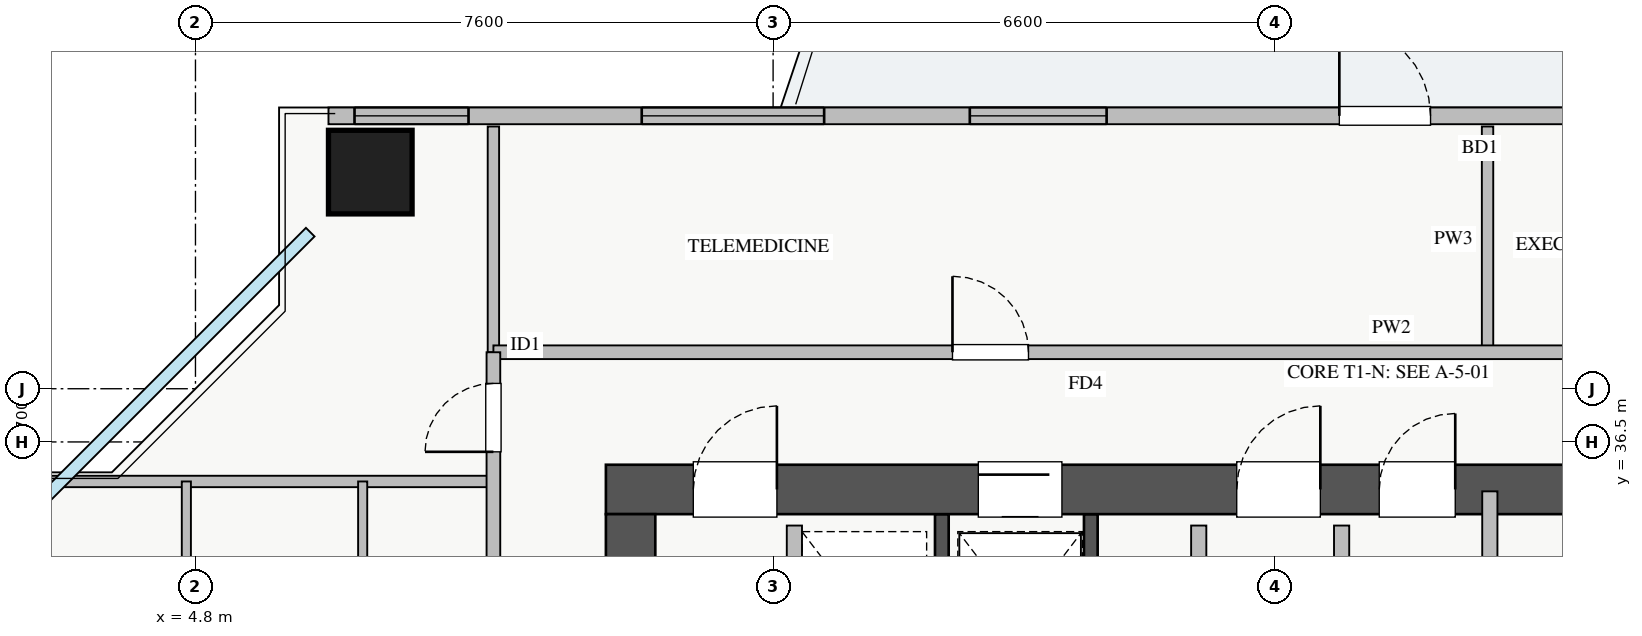
"""IFC4 building model, lengths in metres.
Left out: names, types, materials, properties, quantities, classifications, styles, units other than length and angle.
Written with IfcOpenShell. Run it as: python <this file> out.ifc"""

import sys

from ifc_helpers import new_model, si_unit, direction, frame, frame_2d, origin, origin_2d, place, context, subcontext, project, spatial, rectangle, extrude, source, transform, mapped, element, fill, save


model = new_model("IFC4")
c1 = context("Model", 3, precision=1e-05, world=origin(), true_north=direction((0.0, 1.0)))
c2 = subcontext(c1, "Body", "Model", "MODEL_VIEW")
j1 = project(units=[si_unit("LENGTHUNIT", "METRE"), si_unit("PLANEANGLEUNIT", "RADIAN")], contexts=[c1])
p1 = place(None, origin())
s1 = spatial("IfcSite", under=j1, at=p1, CompositionType="ELEMENT")
p2 = place(p1, origin())
s2 = spatial("IfcBuilding", under=s1, at=p2, CompositionType="ELEMENT")
p3 = place(p2, frame((0.0, 0.0, 126.25)))
s3 = spatial("IfcBuildingStorey", under=s2, at=p3, CompositionType="ELEMENT", Elevation=126.25)
for number, where, z_axis, x_axis in (
    (1, (14.62, 33.2, 0.0), (0.0, 0.0, 1.0), (0.0, 1.0, 0.0)),
    (2, (16.58, 33.2, 0.0), (0.0, 0.0, 1.0), (0.0, 1.0, 0.0)),
):
    element("IfcWall", number, at=place(p3, frame(where, z_axis=z_axis, x_axis=x_axis)), inside=s3, PredefinedType="SHEAR", context=c2, shape_type="SweptSolid", body=[
        extrude(rectangle(XDim=2.35, YDim=0.18, at=frame_2d((1.175, 0.0))), origin(), (0.0, 0.0, 1.0), 3.07),
    ])
p4 = place(p3, frame((10.2, 35.875, 0.0), z_axis=(0.0, 0.0, 1.0), x_axis=(1.0, 0.0, 0.0)))
e3 = element("IfcWall", 3, at=p4, inside=s3, PredefinedType="SHEAR", context=c2, shape_type="SweptSolid", body=[
    extrude(rectangle(XDim=17.6, YDim=0.65, at=frame_2d((8.8, 0.0))), origin(), (0.0, 0.0, 1.0), 3.25),
])
p5 = place(p4, frame((1.15, 0.0, 0.0)))
e4 = element("IfcOpeningElement", 4, at=p5, cuts=e3, PredefinedType="OPENING", context=c2, shape_type="SweptSolid", body=[
    extrude(rectangle(XDim=1.1, YDim=2.05, at=frame_2d((0.55, 1.025))), frame((0.0, 0.335, 0.0), z_axis=(0.0, -1.0, 0.0), x_axis=(1.0, 0.0, 0.0)), (0.0, 0.0, 1.0), 0.67),
])
p6 = place(p4, frame((8.3, 0.0, 0.0)))
e5 = element("IfcOpeningElement", 5, at=p6, cuts=e3, PredefinedType="OPENING", context=c2, shape_type="SweptSolid", body=[
    extrude(rectangle(XDim=1.1, YDim=2.05, at=frame_2d((0.55, 1.025))), frame((0.0, 0.335, 0.0), z_axis=(0.0, -1.0, 0.0), x_axis=(1.0, 0.0, 0.0)), (0.0, 0.0, 1.0), 0.67),
])
p7 = place(p4, frame((4.9, 0.0, 0.0)))
e6 = element("IfcOpeningElement", 6, at=p7, cuts=e3, PredefinedType="OPENING", context=c2, shape_type="SweptSolid", body=[
    extrude(rectangle(XDim=1.1, YDim=2.05, at=frame_2d((0.55, 1.025))), frame((0.0, 0.335, 0.0), z_axis=(0.0, -1.0, 0.0), x_axis=(1.0, 0.0, 0.0)), (0.0, 0.0, 1.0), 0.67),
])
p8 = place(p4, frame((14.74, 0.0, 0.0)))
e7 = element("IfcOpeningElement", 7, at=p8, cuts=e3, PredefinedType="OPENING", context=c2, shape_type="SweptSolid", body=[
    extrude(rectangle(XDim=1.0, YDim=2.05, at=frame_2d((0.5, 1.025))), frame((0.0, 0.335, 0.0), z_axis=(0.0, -1.0, 0.0), x_axis=(1.0, 0.0, 0.0)), (0.0, 0.0, 1.0), 0.67),
])
p9 = place(p4, frame((10.175, 0.0, 0.0)))
e8 = element("IfcOpeningElement", 8, at=p9, cuts=e3, PredefinedType="OPENING", context=c2, shape_type="SweptSolid", body=[
    extrude(rectangle(XDim=1.0, YDim=2.05, at=frame_2d((0.5, 1.025))), frame((0.0, 0.335, 0.0), z_axis=(0.0, -1.0, 0.0), x_axis=(1.0, 0.0, 0.0)), (0.0, 0.0, 1.0), 0.67),
])
p10 = place(p4, frame((12.625, 0.0, 0.0)))
e9 = element("IfcOpeningElement", 9, at=p10, cuts=e3, PredefinedType="OPENING", context=c2, shape_type="SweptSolid", body=[
    extrude(rectangle(XDim=1.0, YDim=2.05, at=frame_2d((0.5, 1.025))), frame((0.0, 0.335, 0.0), z_axis=(0.0, -1.0, 0.0), x_axis=(1.0, 0.0, 0.0)), (0.0, 0.0, 1.0), 0.67),
])
p11 = place(p3, frame((10.525, 29.65, 0.0), z_axis=(0.0, 0.0, 1.0), x_axis=(0.0, 1.0, 0.0)))
e10 = element("IfcWall", 10, at=p11, inside=s3, PredefinedType="SHEAR", context=c2, shape_type="SweptSolid", body=[
    extrude(rectangle(XDim=5.9, YDim=0.65, at=frame_2d((2.95, 0.0))), origin(), (0.0, 0.0, 1.0), 3.25),
])
m1 = source(origin(), c2, "Body", "SweptSolid", [
    extrude(rectangle(XDim=1.1, YDim=1.1, at=origin_2d()), origin(), (0.0, 0.0, 1.0), 3.25),
])
p12 = place(p3, frame((7.1, 40.05, 0.0), z_axis=(0.0, 0.0, 1.0), x_axis=(1.0, 0.0, 0.0)))
e11 = element("IfcColumn", 11, at=p12, inside=s3, PredefinedType="COLUMN", context=c2, shape_type="MappedRepresentation", body=[
    mapped(m1, transform((0.0, 0.0, 0.0), x_axis=(1.0, 0.0, 0.0), y_axis=(0.0, 1.0, 0.0), z_axis=(0.0, 0.0, 1.0), scale=1.0)),
])
p13 = place(p3, frame((6.55, 40.79, 0.0), z_axis=(0.0, 0.0, 1.0), x_axis=(1.0, 0.0, 0.0)))
e12 = element("IfcWall", 12, at=p13, inside=s3, PredefinedType="STANDARD", context=c2, shape_type="SweptSolid", body=[
    extrude(rectangle(XDim=24.9, YDim=0.22, at=frame_2d((12.45, 0.0))), origin(), (0.0, 0.0, 1.0), 2.61),
])
p14 = place(p13, frame((13.3, 0.0, 0.0)))
e13 = element("IfcOpeningElement", 13, at=p14, cuts=e12, PredefinedType="OPENING", context=c2, shape_type="SweptSolid", body=[
    extrude(rectangle(XDim=1.2, YDim=2.1, at=frame_2d((0.6, 1.05))), frame((0.0, 0.12, 0.0), z_axis=(0.0, -1.0, 0.0), x_axis=(1.0, 0.0, 0.0)), (0.0, 0.0, 1.0), 0.24),
])
p15 = place(p13, frame((0.343, 0.0, 0.9)))
e14 = element("IfcOpeningElement", 14, at=p15, cuts=e12, PredefinedType="OPENING", context=c2, shape_type="SweptSolid", body=[
    extrude(rectangle(XDim=1.5, YDim=1.5, at=frame_2d((0.75, 0.75))), frame((0.0, 0.12, 0.0), z_axis=(0.0, -1.0, 0.0), x_axis=(1.0, 0.0, 0.0)), (0.0, 0.0, 1.0), 0.24),
])
p16 = place(p13, frame((8.438, 0.0, 0.9)))
e15 = element("IfcOpeningElement", 15, at=p16, cuts=e12, PredefinedType="OPENING", context=c2, shape_type="SweptSolid", body=[
    extrude(rectangle(XDim=1.8, YDim=1.45, at=frame_2d((0.9, 0.725))), frame((0.0, 0.12, 0.0), z_axis=(0.0, -1.0, 0.0), x_axis=(1.0, 0.0, 0.0)), (0.0, 0.0, 1.0), 0.24),
])
p17 = place(p13, frame((17.261, 0.0, 0.9)))
e16 = element("IfcOpeningElement", 16, at=p17, cuts=e12, PredefinedType="OPENING", context=c2, shape_type="SweptSolid", body=[
    extrude(rectangle(XDim=1.5, YDim=1.5, at=frame_2d((0.75, 0.75))), frame((0.0, 0.12, 0.0), z_axis=(0.0, -1.0, 0.0), x_axis=(1.0, 0.0, 0.0)), (0.0, 0.0, 1.0), 0.24),
])
p18 = place(p13, frame((20.738, 0.0, 0.9)))
e17 = element("IfcOpeningElement", 17, at=p18, cuts=e12, PredefinedType="OPENING", context=c2, shape_type="SweptSolid", body=[
    extrude(rectangle(XDim=2.1, YDim=1.48, at=frame_2d((1.05, 0.74))), frame((0.0, 0.12, 0.0), z_axis=(0.0, -1.0, 0.0), x_axis=(1.0, 0.0, 0.0)), (0.0, 0.0, 1.0), 0.24),
])
p19 = place(p13, frame((4.122, 0.0, 0.9)))
e18 = element("IfcOpeningElement", 18, at=p19, cuts=e12, PredefinedType="OPENING", context=c2, shape_type="SweptSolid", body=[
    extrude(rectangle(XDim=2.4, YDim=1.5, at=frame_2d((1.2, 0.75))), frame((0.0, 0.12, 0.0), z_axis=(0.0, -1.0, 0.0), x_axis=(1.0, 0.0, 0.0)), (0.0, 0.0, 1.0), 0.24),
])
for number, where, z_axis, x_axis in (
    (19, (12.68, 33.19, 0.0), (0.0, 0.0, 1.0), (0.0, 1.0, 0.0)),
    (20, (18.0, 33.19, 0.0), (0.0, 0.0, 1.0), (0.0, 1.0, 0.0)),
    (21, (19.88, 33.19, 0.0), (0.0, 0.0, 1.0), (0.0, 1.0, 0.0)),
):
    element("IfcWall", number, at=place(p3, frame(where, z_axis=z_axis, x_axis=x_axis)), inside=s3, PredefinedType="PARTITIONING", context=c2, shape_type="SweptSolid", body=[
        extrude(rectangle(XDim=2.21, YDim=0.2, at=frame_2d((1.105, 0.0))), origin(), (0.0, 0.0, 1.0), 3.07),
    ])
p20 = place(p3, frame((21.83, 33.2, 0.0), z_axis=(0.0, 0.0, 1.0), x_axis=(0.0, 1.0, 0.0)))
e22 = element("IfcWall", 22, at=p20, inside=s3, PredefinedType="PARTITIONING", context=c2, shape_type="SweptSolid", body=[
    extrude(rectangle(XDim=2.65, YDim=0.2, at=frame_2d((1.325, 0.0))), origin(), (0.0, 0.0, 1.0), 3.07),
])
for number, where, z_axis, x_axis in (
    (23, (21.8, 37.68, 0.0), (0.0, 0.0, 1.0), (0.0, 1.0, 0.0)),
    (24, (8.72, 37.68, 0.0), (0.0, 0.0, 1.0), (0.0, 1.0, 0.0)),
):
    element("IfcWall", number, at=place(p3, frame(where, z_axis=z_axis, x_axis=x_axis)), inside=s3, PredefinedType="PARTITIONING", context=c2, shape_type="SweptSolid", body=[
        extrude(rectangle(XDim=2.97, YDim=0.15, at=frame_2d((1.485, 0.0))), origin(), (0.0, 0.0, 1.0), 3.07),
    ])
p21 = place(p3, frame((8.72, 37.68, 0.0), z_axis=(0.0, 0.0, 1.0), x_axis=(1.0, 0.0, 0.0)))
e25 = element("IfcWall", 25, at=p21, inside=s3, PredefinedType="PARTITIONING", context=c2, shape_type="SweptSolid", body=[
    extrude(rectangle(XDim=23.63, YDim=0.18, at=frame_2d((11.815, 0.0))), origin(), (0.0, 0.0, 1.0), 3.07),
])
p22 = place(p21, frame((6.04, 0.0, 0.0)))
e26 = element("IfcOpeningElement", 26, at=p22, cuts=e25, PredefinedType="OPENING", context=c2, shape_type="SweptSolid", body=[
    extrude(rectangle(XDim=1.0, YDim=2.05, at=frame_2d((0.5, 1.025))), frame((0.0, 0.1, 0.0), z_axis=(0.0, -1.0, 0.0), x_axis=(1.0, 0.0, 0.0)), (0.0, 0.0, 1.0), 0.2),
])
p23 = place(p21, frame((17.67, 0.0, 0.0)))
e27 = element("IfcOpeningElement", 27, at=p23, cuts=e25, PredefinedType="OPENING", context=c2, shape_type="SweptSolid", body=[
    extrude(rectangle(XDim=1.0, YDim=2.05, at=frame_2d((0.5, 1.025))), frame((0.0, 0.1, 0.0), z_axis=(0.0, -1.0, 0.0), x_axis=(1.0, 0.0, 0.0)), (0.0, 0.0, 1.0), 0.2),
])
p24 = place(p3, frame((1.35, 35.98, 0.0), z_axis=(0.0, 0.0, 1.0), x_axis=(1.0, 0.0, 0.0)))
e28 = element("IfcWall", 28, at=p24, inside=s3, PredefinedType="PARTITIONING", context=c2, shape_type="SweptSolid", body=[
    extrude(rectangle(XDim=7.37, YDim=0.15, at=frame_2d((3.685, 0.0))), origin(), (0.0, 0.0, 1.0), 3.07),
])
p25 = place(p3, frame((4.68, 31.42, 0.0), z_axis=(0.0, 0.0, 1.0), x_axis=(0.0, 1.0, 0.0)))
e29 = element("IfcWall", 29, at=p25, inside=s3, PredefinedType="PLUMBINGWALL", context=c2, shape_type="SweptSolid", body=[
    extrude(rectangle(XDim=4.56, YDim=0.12, at=frame_2d((2.28, 0.0))), origin(), (0.0, 0.0, 1.0), 3.07),
])
p26 = place(p3, frame((7.0, 31.42, 0.0), z_axis=(0.0, 0.0, 1.0), x_axis=(0.0, 1.0, 0.0)))
e30 = element("IfcWall", 30, at=p26, inside=s3, PredefinedType="PLUMBINGWALL", context=c2, shape_type="SweptSolid", body=[
    extrude(rectangle(XDim=4.56, YDim=0.12, at=frame_2d((2.28, 0.0))), origin(), (0.0, 0.0, 1.0), 2.577),
])
p27 = place(p3, frame((8.72, 8.31, 0.0), z_axis=(0.0, 0.0, 1.0), x_axis=(0.0, 1.0, 0.0)))
e31 = element("IfcWall", 31, at=p27, inside=s3, PredefinedType="PARTITIONING", context=c2, shape_type="SweptSolid", body=[
    extrude(rectangle(XDim=29.37, YDim=0.18, at=frame_2d((14.685, 0.0))), origin(), (0.0, 0.0, 1.0), 3.07),
])
p28 = place(p27, frame((28.06, 0.0, 0.0)))
e32 = element("IfcOpeningElement", 32, at=p28, cuts=e31, PredefinedType="OPENING", context=c2, shape_type="SweptSolid", body=[
    extrude(rectangle(XDim=0.9, YDim=2.05, at=frame_2d((0.45, 1.025))), frame((0.0, 0.1, 0.0), z_axis=(0.0, -1.0, 0.0), x_axis=(1.0, 0.0, 0.0)), (0.0, 0.0, 1.0), 0.2),
])
p29 = place(p27, frame((0.24, 0.0, 0.0)))
e33 = element("IfcOpeningElement", 33, at=p29, cuts=e31, PredefinedType="OPENING", context=c2, shape_type="SweptSolid", body=[
    extrude(rectangle(XDim=0.9, YDim=2.05, at=frame_2d((0.45, 1.025))), frame((0.0, 0.1, 0.0), z_axis=(0.0, -1.0, 0.0), x_axis=(1.0, 0.0, 0.0)), (0.0, 0.0, 1.0), 0.2),
])
p30 = place(p27, frame((2.92, 0.0, 0.0)))
e34 = element("IfcOpeningElement", 34, at=p30, cuts=e31, PredefinedType="OPENING", context=c2, shape_type="SweptSolid", body=[
    extrude(rectangle(XDim=1.0, YDim=2.05, at=frame_2d((0.5, 1.025))), frame((0.0, 0.1, 0.0), z_axis=(0.0, -1.0, 0.0), x_axis=(1.0, 0.0, 0.0)), (0.0, 0.0, 1.0), 0.2),
])
p31 = place(p27, frame((14.315, 0.0, 0.0)))
e35 = element("IfcOpeningElement", 35, at=p31, cuts=e31, PredefinedType="OPENING", context=c2, shape_type="SweptSolid", body=[
    extrude(rectangle(XDim=1.0, YDim=2.05, at=frame_2d((0.5, 1.025))), frame((0.0, 0.1, 0.0), z_axis=(0.0, -1.0, 0.0), x_axis=(1.0, 0.0, 0.0)), (0.0, 0.0, 1.0), 0.2),
])
p32 = place(p27, frame((20.315, 0.0, 0.0)))
e36 = element("IfcOpeningElement", 36, at=p32, cuts=e31, PredefinedType="OPENING", context=c2, shape_type="SweptSolid", body=[
    extrude(rectangle(XDim=1.0, YDim=2.05, at=frame_2d((0.5, 1.025))), frame((0.0, 0.1, 0.0), z_axis=(0.0, -1.0, 0.0), x_axis=(1.0, 0.0, 0.0)), (0.0, 0.0, 1.0), 0.2),
])
m2 = source(origin(), c2, "Body", "SweptSolid", [
    extrude(rectangle(XDim=1.2, YDim=2.1, at=frame_2d((0.6, 1.05))), frame((0.0, 0.025, 0.0), z_axis=(0.0, -1.0, 0.0), x_axis=(1.0, 0.0, 0.0)), (0.0, 0.0, 1.0), 0.05),
])
p33 = place(p14, origin())
e37 = element("IfcDoor", 37, at=p33, inside=s3, OperationType="SINGLE_SWING_LEFT", PredefinedType="DOOR", context=c2, shape_type="MappedRepresentation", body=[
    mapped(m2, transform((0.0, 0.0, 0.0), x_axis=(1.0, 0.0, 0.0), y_axis=(0.0, 1.0, 0.0), z_axis=(0.0, 0.0, 1.0), scale=1.0)),
])
fill(e13, e37)
m3 = source(origin(), c2, "Body", "SweptSolid", [
    extrude(rectangle(XDim=1.5, YDim=1.5, at=frame_2d((0.75, 0.75))), frame((0.0, 0.03, 0.0), z_axis=(0.0, -1.0, 0.0), x_axis=(1.0, 0.0, 0.0)), (0.0, 0.0, 1.0), 0.06),
])
p34 = place(p15, origin())
e38 = element("IfcWindow", 38, at=p34, inside=s3, PartitioningType="TRIPLE_PANEL_VERTICAL", PredefinedType="WINDOW", context=c2, shape_type="MappedRepresentation", body=[
    mapped(m3, transform((0.0, 0.0, 0.0), x_axis=(1.0, 0.0, 0.0), y_axis=(0.0, 1.0, 0.0), z_axis=(0.0, 0.0, 1.0), scale=1.0)),
])
fill(e14, e38)
m4 = source(origin(), c2, "Body", "SweptSolid", [
    extrude(rectangle(XDim=1.8, YDim=1.45, at=frame_2d((0.9, 0.725))), frame((0.0, 0.03, 0.0), z_axis=(0.0, -1.0, 0.0), x_axis=(1.0, 0.0, 0.0)), (0.0, 0.0, 1.0), 0.06),
])
p35 = place(p16, origin())
e39 = element("IfcWindow", 39, at=p35, inside=s3, PartitioningType="DOUBLE_PANEL_VERTICAL", PredefinedType="WINDOW", context=c2, shape_type="MappedRepresentation", body=[
    mapped(m4, transform((0.0, 0.0, 0.0), x_axis=(1.0, 0.0, 0.0), y_axis=(0.0, 1.0, 0.0), z_axis=(0.0, 0.0, 1.0), scale=1.0)),
])
fill(e15, e39)
m5 = source(origin(), c2, "Body", "SweptSolid", [
    extrude(rectangle(XDim=1.1, YDim=2.05, at=frame_2d((0.55, 1.025))), frame((0.0, 0.025, 0.0), z_axis=(0.0, -1.0, 0.0), x_axis=(1.0, 0.0, 0.0)), (0.0, 0.0, 1.0), 0.05),
])
p36 = place(p5, origin())
e40 = element("IfcDoor", 40, at=p36, inside=s3, OperationType="SINGLE_SWING_RIGHT", PredefinedType="DOOR", context=c2, shape_type="MappedRepresentation", body=[
    mapped(m5, transform((0.0, 0.0, 0.0), x_axis=(1.0, 0.0, 0.0), y_axis=(0.0, 1.0, 0.0), z_axis=(0.0, 0.0, 1.0), scale=1.0)),
])
fill(e4, e40)
p37 = place(p6, origin())
e41 = element("IfcDoor", 41, at=p37, inside=s3, OperationType="SINGLE_SWING_RIGHT", PredefinedType="DOOR", context=c2, shape_type="MappedRepresentation", body=[
    mapped(m5, transform((0.0, 0.0, 0.0), x_axis=(1.0, 0.0, 0.0), y_axis=(0.0, 1.0, 0.0), z_axis=(0.0, 0.0, 1.0), scale=1.0)),
])
fill(e5, e41)
p38 = place(p7, origin())
e42 = element("IfcDoor", 42, at=p38, inside=s3, OperationType="SLIDING_TO_LEFT", PredefinedType="DOOR", context=c2, shape_type="MappedRepresentation", body=[
    mapped(m5, transform((0.0, 0.0, 0.0), x_axis=(1.0, 0.0, 0.0), y_axis=(0.0, 1.0, 0.0), z_axis=(0.0, 0.0, 1.0), scale=1.0)),
])
fill(e6, e42)
m6 = source(origin(), c2, "Body", "SweptSolid", [
    extrude(rectangle(XDim=1.0, YDim=2.05, at=frame_2d((0.5, 1.025))), frame((0.0, 0.025, 0.0), z_axis=(0.0, -1.0, 0.0), x_axis=(1.0, 0.0, 0.0)), (0.0, 0.0, 1.0), 0.05),
])
p39 = place(p9, origin())
e43 = element("IfcDoor", 43, at=p39, inside=s3, OperationType="SINGLE_SWING_RIGHT", PredefinedType="DOOR", context=c2, shape_type="MappedRepresentation", body=[
    mapped(m6, transform((0.0, 0.0, 0.0), x_axis=(1.0, 0.0, 0.0), y_axis=(0.0, 1.0, 0.0), z_axis=(0.0, 0.0, 1.0), scale=1.0)),
])
fill(e8, e43)
p40 = place(p22, origin())
e44 = element("IfcDoor", 44, at=p40, inside=s3, OperationType="SINGLE_SWING_LEFT", PredefinedType="DOOR", context=c2, shape_type="MappedRepresentation", body=[
    mapped(m6, transform((0.0, 0.0, 0.0), x_axis=(1.0, 0.0, 0.0), y_axis=(0.0, 1.0, 0.0), z_axis=(0.0, 0.0, 1.0), scale=1.0)),
])
fill(e26, e44)
m7 = source(origin(), c2, "Body", "SweptSolid", [
    extrude(rectangle(XDim=0.9, YDim=2.05, at=frame_2d((0.45, 1.025))), frame((0.0, 0.025, 0.0), z_axis=(0.0, -1.0, 0.0), x_axis=(1.0, 0.0, 0.0)), (0.0, 0.0, 1.0), 0.05),
])
p41 = place(p28, origin())
e45 = element("IfcDoor", 45, at=p41, inside=s3, OperationType="SINGLE_SWING_LEFT", PredefinedType="DOOR", context=c2, shape_type="MappedRepresentation", body=[
    mapped(m7, transform((0.0, 0.0, 0.0), x_axis=(1.0, 0.0, 0.0), y_axis=(0.0, 1.0, 0.0), z_axis=(0.0, 0.0, 1.0), scale=1.0)),
])
fill(e32, e45)
m8 = source(origin(), c2, "Body", "SweptSolid", [
    extrude(rectangle(XDim=2.4, YDim=1.5, at=frame_2d((1.2, 0.75))), frame((0.0, 0.03, 0.0), z_axis=(0.0, -1.0, 0.0), x_axis=(1.0, 0.0, 0.0)), (0.0, 0.0, 1.0), 0.06),
])
p42 = place(p19, origin())
e46 = element("IfcWindow", 46, at=p42, inside=s3, PartitioningType="TRIPLE_PANEL_VERTICAL", PredefinedType="WINDOW", context=c2, shape_type="MappedRepresentation", body=[
    mapped(m8, transform((0.0, 0.0, 0.0), x_axis=(1.0, 0.0, 0.0), y_axis=(0.0, 1.0, 0.0), z_axis=(0.0, 0.0, 1.0), scale=1.0)),
])
fill(e18, e46)
save(model, sys.argv[1])
